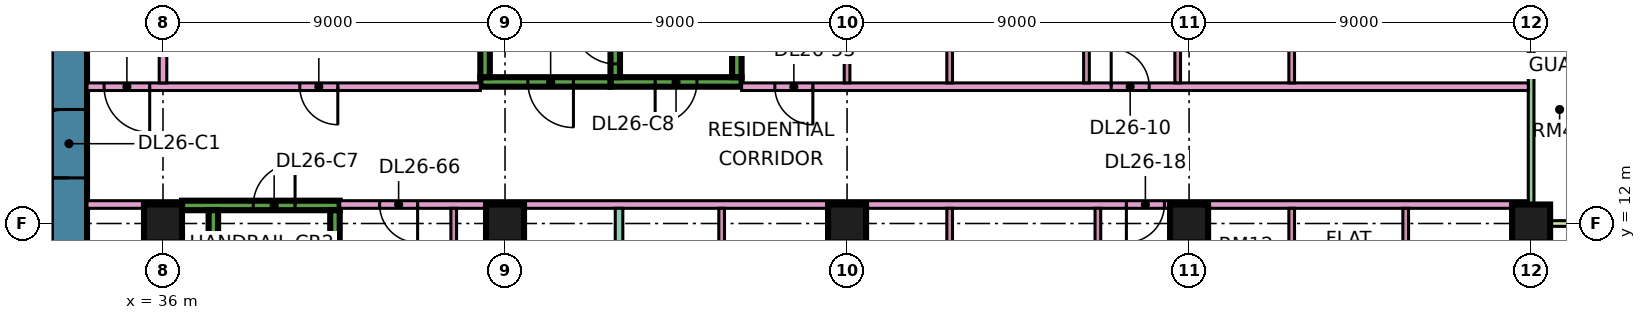
"""IFC4 building model, lengths in metres.
Left out: names, types, materials, properties, quantities, classifications, styles, units other than length and angle.
Written with IfcOpenShell. Run it as: python <this file> out.ifc"""

import sys

from ifc_helpers import new_model, si_unit, direction, frame, frame_2d, origin, origin_2d, place, context, subcontext, project, spatial, rectangle, extrude, element, fill, save


model = new_model("IFC4")
c1 = context("Model", 3, precision=1e-05, world=origin(), true_north=direction((0.0, 1.0)))
c2 = subcontext(c1, "Body", "Model", "MODEL_VIEW")
j1 = project(units=[si_unit("LENGTHUNIT", "METRE"), si_unit("PLANEANGLEUNIT", "RADIAN")], contexts=[c1])
p1 = place(None, origin())
s1 = spatial("IfcSite", under=j1, at=p1, CompositionType="ELEMENT")
p2 = place(p1, origin())
s2 = spatial("IfcBuilding", under=s1, at=p2, CompositionType="ELEMENT")
p3 = place(p2, frame((0.0, 0.0, 114.4)))
s3 = spatial("IfcBuildingStorey", under=s2, at=p3, CompositionType="ELEMENT", Elevation=114.4)
for number, where, z_axis, x_axis in (
    (1, (36.0, 12.0, 0.0), (0.0, 0.0, 1.0), (1.0, 0.0, 0.0)),
    (2, (45.0, 12.0, 0.0), (0.0, 0.0, 1.0), (1.0, 0.0, 0.0)),
    (3, (54.0, 12.0, 0.0), (0.0, 0.0, 1.0), (1.0, 0.0, 0.0)),
    (4, (63.0, 12.0, 0.0), (0.0, 0.0, 1.0), (1.0, 0.0, 0.0)),
    (5, (72.0, 12.0, 0.0), (0.0, 0.0, 1.0), (1.0, 0.0, 0.0)),
):
    element("IfcColumn", number, at=place(p3, frame(where, z_axis=z_axis, x_axis=x_axis)), inside=s3, PredefinedType="COLUMN", context=c2, shape_type="SweptSolid", body=[
        extrude(rectangle(XDim=1.0, YDim=1.0, at=origin_2d()), origin(), (0.0, 0.0, 1.0), 3.75),
    ])
p4 = place(p3, frame((33.525, 7.95, 0.0), z_axis=(0.0, 0.0, 1.0), x_axis=(0.0, 1.0, 0.0)))
e6 = element("IfcWall", 6, at=p4, inside=s3, PredefinedType="SHEAR", context=c2, shape_type="SweptSolid", body=[
    extrude(rectangle(XDim=11.1, YDim=0.95, at=frame_2d((5.55, 0.0))), origin(), (0.0, 0.0, 1.0), 3.75),
])
p5 = place(p4, frame((5.25, 0.0, 0.0)))
e7 = element("IfcOpeningElement", 7, at=p5, cuts=e6, PredefinedType="OPENING", context=c2, shape_type="SweptSolid", body=[
    extrude(rectangle(XDim=1.8, YDim=2.4, at=frame_2d((0.9, 1.2))), frame((0.0, 0.485, 0.0), z_axis=(0.0, -1.0, 0.0), x_axis=(1.0, 0.0, 0.0)), (0.0, 0.0, 1.0), 0.97),
])
p6 = place(p3, frame((36.5, 12.475, 0.0), z_axis=(0.0, 0.0, 1.0), x_axis=(1.0, 0.0, 0.0)))
e8 = element("IfcWall", 8, at=p6, inside=s3, PredefinedType="SHEAR", context=c2, shape_type="SweptSolid", body=[
    extrude(rectangle(XDim=4.15, YDim=0.25, at=frame_2d((2.075, 0.0))), origin(), (0.0, 0.0, 1.0), 3.75),
])
p7 = place(p6, frame((1.875, 0.0, 0.0)))
e9 = element("IfcOpeningElement", 9, at=p7, cuts=e8, PredefinedType="OPENING", context=c2, shape_type="SweptSolid", body=[
    extrude(rectangle(XDim=1.1, YDim=2.2, at=frame_2d((0.55, 1.1))), frame((0.0, 0.135, 0.0), z_axis=(0.0, -1.0, 0.0), x_axis=(1.0, 0.0, 0.0)), (0.0, 0.0, 1.0), 0.27),
])
for number, where, z_axis, x_axis in (
    (10, (37.325, 5.85, 0.0), (0.0, 0.0, 1.0), (0.0, 1.0, 0.0)),
    (11, (40.525, 5.85, 0.0), (0.0, 0.0, 1.0), (0.0, 1.0, 0.0)),
):
    element("IfcWall", number, at=place(p3, frame(where, z_axis=z_axis, x_axis=x_axis)), inside=s3, PredefinedType="SHEAR", context=c2, shape_type="SweptSolid", body=[
        extrude(rectangle(XDim=6.5, YDim=0.25, at=frame_2d((3.25, 0.0))), origin(), (0.0, 0.0, 1.0), 3.75),
    ])
p8 = place(p3, frame((47.775, 15.725, 0.0), z_axis=(0.0, 0.0, 1.0), x_axis=(1.0, 0.0, 0.0)))
e12 = element("IfcWall", 12, at=p8, inside=s3, PredefinedType="SHEAR", context=c2, shape_type="SweptSolid", body=[
    extrude(rectangle(XDim=3.45, YDim=0.25, at=frame_2d((1.725, 0.0))), origin(), (0.0, 0.0, 1.0), 3.75),
])
p9 = place(p8, frame((1.175, 0.0, 0.0)))
e13 = element("IfcOpeningElement", 13, at=p9, cuts=e12, PredefinedType="OPENING", context=c2, shape_type="SweptSolid", body=[
    extrude(rectangle(XDim=1.1, YDim=2.2, at=frame_2d((0.55, 1.1))), frame((0.0, 0.135, 0.0), z_axis=(0.0, -1.0, 0.0), x_axis=(1.0, 0.0, 0.0)), (0.0, 0.0, 1.0), 0.27),
])
p10 = place(p3, frame((47.9, 15.85, 0.0), z_axis=(0.0, 0.0, 1.0), x_axis=(0.0, 1.0, 0.0)))
e14 = element("IfcWall", 14, at=p10, inside=s3, PredefinedType="SHEAR", context=c2, shape_type="SweptSolid", body=[
    extrude(rectangle(XDim=6.5, YDim=0.25, at=frame_2d((3.25, 0.0))), origin(), (0.0, 0.0, 1.0), 3.75),
])
p11 = place(p10, frame((0.35, 0.0, 0.0)))
e15 = element("IfcOpeningElement", 15, at=p11, cuts=e14, PredefinedType="OPENING", context=c2, shape_type="SweptSolid", body=[
    extrude(rectangle(XDim=1.1, YDim=2.2, at=frame_2d((0.55, 1.1))), frame((0.0, 0.135, 0.0), z_axis=(0.0, -1.0, 0.0), x_axis=(1.0, 0.0, 0.0)), (0.0, 0.0, 1.0), 0.27),
])
p12 = place(p3, frame((51.1, 15.85, 0.0), z_axis=(0.0, 0.0, 1.0), x_axis=(0.0, 1.0, 0.0)))
e16 = element("IfcWall", 16, at=p12, inside=s3, PredefinedType="SHEAR", context=c2, shape_type="SweptSolid", body=[
    extrude(rectangle(XDim=6.5, YDim=0.25, at=frame_2d((3.25, 0.0))), origin(), (0.0, 0.0, 1.0), 3.75),
])
p13 = place(p3, frame((44.35, 15.725, 0.0), z_axis=(0.0, 0.0, 1.0), x_axis=(1.0, 0.0, 0.0)))
e17 = element("IfcWall", 17, at=p13, inside=s3, PredefinedType="SHEAR", context=c2, shape_type="SweptSolid", body=[
    extrude(rectangle(XDim=3.425, YDim=0.25, at=frame_2d((1.712, 0.0))), origin(), (0.0, 0.0, 1.0), 3.75),
])
p14 = place(p13, frame((1.25, 0.0, 0.0)))
e18 = element("IfcOpeningElement", 18, at=p14, cuts=e17, PredefinedType="OPENING", context=c2, shape_type="SweptSolid", body=[
    extrude(rectangle(XDim=1.2, YDim=2.2, at=frame_2d((0.6, 1.1))), frame((0.0, 0.135, 0.0), z_axis=(0.0, -1.0, 0.0), x_axis=(1.0, 0.0, 0.0)), (0.0, 0.0, 1.0), 0.27),
])
p15 = place(p3, frame((44.475, 15.85, 0.0), z_axis=(0.0, 0.0, 1.0), x_axis=(0.0, 1.0, 0.0)))
e19 = element("IfcWall", 19, at=p15, inside=s3, PredefinedType="SHEAR", context=c2, shape_type="SweptSolid", body=[
    extrude(rectangle(XDim=6.5, YDim=0.25, at=frame_2d((3.25, 0.0))), origin(), (0.0, 0.0, 1.0), 3.75),
])
p16 = place(p15, frame((1.75, 0.0, 0.0)))
e20 = element("IfcOpeningElement", 20, at=p16, cuts=e19, PredefinedType="OPENING", context=c2, shape_type="SweptSolid", body=[
    extrude(rectangle(XDim=1.1, YDim=2.2, at=frame_2d((0.55, 1.1))), frame((0.0, 0.135, 0.0), z_axis=(0.0, -1.0, 0.0), x_axis=(1.0, 0.0, 0.0)), (0.0, 0.0, 1.0), 0.27),
])
p17 = place(p15, frame((4.3, 0.0, 0.0)))
e21 = element("IfcOpeningElement", 21, at=p17, cuts=e19, PredefinedType="OPENING", context=c2, shape_type="SweptSolid", body=[
    extrude(rectangle(XDim=1.1, YDim=2.2, at=frame_2d((0.55, 1.1))), frame((0.0, 0.135, 0.0), z_axis=(0.0, -1.0, 0.0), x_axis=(1.0, 0.0, 0.0)), (0.0, 0.0, 1.0), 0.27),
])
p18 = place(p3, frame((72.0, 12.075, 0.0), z_axis=(0.0, 0.0, 1.0), x_axis=(0.0, 1.0, 0.0)))
e22 = element("IfcWall", 22, at=p18, inside=s3, PredefinedType="SOLIDWALL", context=c2, shape_type="SweptSolid", body=[
    extrude(rectangle(XDim=10.35, YDim=0.15, at=frame_2d((5.175, 0.0))), origin(), (0.0, 0.0, 1.0), 3.35),
])
p19 = place(p18, frame((3.975, 0.0, 0.45)))
e23 = element("IfcOpeningElement", 23, at=p19, cuts=e22, PredefinedType="OPENING", context=c2, shape_type="SweptSolid", body=[
    extrude(rectangle(XDim=2.4, YDim=2.4, at=frame_2d((1.2, 1.2))), frame((0.0, 0.085, 0.0), z_axis=(0.0, -1.0, 0.0), x_axis=(1.0, 0.0, 0.0)), (0.0, 0.0, 1.0), 0.17),
])
p20 = place(p18, frame((7.688, 0.0, 0.0)))
e24 = element("IfcOpeningElement", 24, at=p20, cuts=e22, PredefinedType="OPENING", context=c2, shape_type="SweptSolid", body=[
    extrude(rectangle(XDim=1.8, YDim=2.4, at=frame_2d((0.9, 1.2))), frame((0.0, 0.085, 0.0), z_axis=(0.0, -1.0, 0.0), x_axis=(1.0, 0.0, 0.0)), (0.0, 0.0, 1.0), 0.17),
])
p21 = place(p3, frame((73.5, 12.0, 0.0), z_axis=(0.0, 0.0, 1.0), x_axis=(-1.0, 0.0, 0.0)))
e25 = element("IfcWall", 25, at=p21, inside=s3, PredefinedType="SOLIDWALL", context=c2, shape_type="SweptSolid", body=[
    extrude(rectangle(XDim=1.5, YDim=0.15, at=frame_2d((0.75, 0.0))), origin(), (0.0, 0.0, 1.0), 3.35),
])
p22 = place(p3, frame((34.0, 12.5, 0.0), z_axis=(0.0, 0.0, 1.0), x_axis=(1.0, 0.0, 0.0)))
e26 = element("IfcWall", 26, at=p22, inside=s3, PredefinedType="PARTITIONING", context=c2, shape_type="SweptSolid", body=[
    extrude(rectangle(XDim=2.501, YDim=0.2, at=frame_2d((1.25, 0.0))), origin(), (0.0, 0.0, 1.0), 3.35),
])
p23 = place(p3, frame((34.0, 15.6, 0.0), z_axis=(0.0, 0.0, 1.0), x_axis=(1.0, 0.0, 0.0)))
e27 = element("IfcWall", 27, at=p23, inside=s3, PredefinedType="PARTITIONING", context=c2, shape_type="SweptSolid", body=[
    extrude(rectangle(XDim=10.35, YDim=0.2, at=frame_2d((5.175, 0.0))), origin(), (0.0, 0.0, 1.0), 3.35),
])
p24 = place(p23, frame((5.6, 0.0, 0.0)))
e28 = element("IfcOpeningElement", 28, at=p24, cuts=e27, PredefinedType="OPENING", context=c2, shape_type="SweptSolid", body=[
    extrude(rectangle(XDim=1.0, YDim=2.1, at=frame_2d((0.5, 1.05))), frame((0.0, 0.11, 0.0), z_axis=(0.0, -1.0, 0.0), x_axis=(1.0, 0.0, 0.0)), (0.0, 0.0, 1.0), 0.22),
])
p25 = place(p23, frame((0.45, 0.0, 0.0)))
e29 = element("IfcOpeningElement", 29, at=p25, cuts=e27, PredefinedType="OPENING", context=c2, shape_type="SweptSolid", body=[
    extrude(rectangle(XDim=1.2, YDim=2.1, at=frame_2d((0.6, 1.05))), frame((0.0, 0.11, 0.0), z_axis=(0.0, -1.0, 0.0), x_axis=(1.0, 0.0, 0.0)), (0.0, 0.0, 1.0), 0.22),
])
p26 = place(p3, frame((36.0, 15.7, 0.0), z_axis=(0.0, 0.0, 1.0), x_axis=(0.0, 1.0, 0.0)))
e30 = element("IfcWall", 30, at=p26, inside=s3, PredefinedType="PARTITIONING", context=c2, shape_type="SweptSolid", body=[
    extrude(rectangle(XDim=8.3, YDim=0.2, at=frame_2d((4.15, 0.0))), origin(), (0.0, 0.0, 1.0), 3.35),
])
p27 = place(p3, frame((40.65, 12.5, 0.0), z_axis=(0.0, 0.0, 1.0), x_axis=(1.0, 0.0, 0.0)))
e31 = element("IfcWall", 31, at=p27, inside=s3, PredefinedType="PARTITIONING", context=c2, shape_type="SweptSolid", body=[
    extrude(rectangle(XDim=31.276, YDim=0.2, at=frame_2d((15.638, 0.0))), origin(), (0.0, 0.0, 1.0), 3.35),
])
p28 = place(p27, frame((20.7, 0.0, 0.0)))
e32 = element("IfcOpeningElement", 32, at=p28, cuts=e31, PredefinedType="OPENING", context=c2, shape_type="SweptSolid", body=[
    extrude(rectangle(XDim=1.0, YDim=2.1, at=frame_2d((0.5, 1.05))), frame((0.0, 0.11, 0.0), z_axis=(0.0, -1.0, 0.0), x_axis=(1.0, 0.0, 0.0)), (0.0, 0.0, 1.0), 0.22),
])
p29 = place(p27, frame((1.05, 0.0, 0.0)))
e33 = element("IfcOpeningElement", 33, at=p29, cuts=e31, PredefinedType="OPENING", context=c2, shape_type="SweptSolid", body=[
    extrude(rectangle(XDim=1.0, YDim=2.1, at=frame_2d((0.5, 1.05))), frame((0.0, 0.11, 0.0), z_axis=(0.0, -1.0, 0.0), x_axis=(1.0, 0.0, 0.0)), (0.0, 0.0, 1.0), 0.22),
])
p30 = place(p3, frame((43.65, 5.825, 0.0), z_axis=(0.0, 0.0, 1.0), x_axis=(0.0, 1.0, 0.0)))
e34 = element("IfcWall", 34, at=p30, inside=s3, PredefinedType="PARTITIONING", context=c2, shape_type="SweptSolid", body=[
    extrude(rectangle(XDim=6.575, YDim=0.15, at=frame_2d((3.288, 0.0))), origin(), (0.0, 0.0, 1.0), 3.35),
])
p31 = place(p30, frame((4.425, 0.0, 0.0)))
e35 = element("IfcOpeningElement", 35, at=p31, cuts=e34, PredefinedType="OPENING", context=c2, shape_type="SweptSolid", body=[
    extrude(rectangle(XDim=0.9, YDim=2.1, at=frame_2d((0.45, 1.05))), frame((0.0, 0.085, 0.0), z_axis=(0.0, -1.0, 0.0), x_axis=(1.0, 0.0, 0.0)), (0.0, 0.0, 1.0), 0.17),
])
p32 = place(p3, frame((48.0, 0.0, 0.0), z_axis=(0.0, 0.0, 1.0), x_axis=(0.0, 1.0, 0.0)))
e36 = element("IfcWall", 36, at=p32, inside=s3, PredefinedType="PARTITIONING", context=c2, shape_type="SweptSolid", body=[
    extrude(rectangle(XDim=12.4, YDim=0.2, at=frame_2d((6.2, 0.0))), origin(), (0.0, 0.0, 1.0), 3.35),
])
p33 = place(p3, frame((50.7, 8.375, 0.0), z_axis=(0.0, 0.0, 1.0), x_axis=(0.0, 1.0, 0.0)))
e37 = element("IfcWall", 37, at=p33, inside=s3, PredefinedType="PARTITIONING", context=c2, shape_type="SweptSolid", body=[
    extrude(rectangle(XDim=4.025, YDim=0.15, at=frame_2d((2.012, 0.0))), origin(), (0.0, 0.0, 1.0), 3.35),
])
p34 = place(p3, frame((51.225, 15.6, 0.0), z_axis=(0.0, 0.0, 1.0), x_axis=(1.0, 0.0, 0.0)))
e38 = element("IfcWall", 38, at=p34, inside=s3, PredefinedType="PARTITIONING", context=c2, shape_type="SweptSolid", body=[
    extrude(rectangle(XDim=20.701, YDim=0.2, at=frame_2d((10.351, 0.0))), origin(), (0.0, 0.0, 1.0), 3.35),
])
p35 = place(p34, frame((9.725, 0.0, 0.0)))
e39 = element("IfcOpeningElement", 39, at=p35, cuts=e38, PredefinedType="OPENING", context=c2, shape_type="SweptSolid", body=[
    extrude(rectangle(XDim=1.0, YDim=2.1, at=frame_2d((0.5, 1.05))), frame((0.0, 0.11, 0.0), z_axis=(0.0, -1.0, 0.0), x_axis=(1.0, 0.0, 0.0)), (0.0, 0.0, 1.0), 0.22),
])
p36 = place(p34, frame((0.875, 0.0, 0.0)))
e40 = element("IfcOpeningElement", 40, at=p36, cuts=e38, PredefinedType="OPENING", context=c2, shape_type="SweptSolid", body=[
    extrude(rectangle(XDim=1.0, YDim=2.1, at=frame_2d((0.5, 1.05))), frame((0.0, 0.11, 0.0), z_axis=(0.0, -1.0, 0.0), x_axis=(1.0, 0.0, 0.0)), (0.0, 0.0, 1.0), 0.22),
])
p37 = place(p3, frame((53.7, 8.375, 0.0), z_axis=(0.0, 0.0, 1.0), x_axis=(0.0, 1.0, 0.0)))
e41 = element("IfcWall", 41, at=p37, inside=s3, PredefinedType="PARTITIONING", context=c2, shape_type="SweptSolid", body=[
    extrude(rectangle(XDim=4.025, YDim=0.15, at=frame_2d((2.012, 0.0))), origin(), (0.0, 0.0, 1.0), 3.35),
])
p38 = place(p3, frame((54.0, 15.7, 0.0), z_axis=(0.0, 0.0, 1.0), x_axis=(0.0, 1.0, 0.0)))
e42 = element("IfcWall", 42, at=p38, inside=s3, PredefinedType="PARTITIONING", context=c2, shape_type="SweptSolid", body=[
    extrude(rectangle(XDim=3.2, YDim=0.15, at=frame_2d((1.6, 0.0))), origin(), (0.0, 0.0, 1.0), 3.35),
])
p39 = place(p3, frame((56.7, 8.375, 0.0), z_axis=(0.0, 0.0, 1.0), x_axis=(0.0, 1.0, 0.0)))
e43 = element("IfcWall", 43, at=p39, inside=s3, PredefinedType="PARTITIONING", context=c2, shape_type="SweptSolid", body=[
    extrude(rectangle(XDim=4.025, YDim=0.15, at=frame_2d((2.012, 0.0))), origin(), (0.0, 0.0, 1.0), 3.35),
])
for number, where, z_axis, x_axis in (
    (44, (56.7, 15.7, 0.0), (0.0, 0.0, 1.0), (0.0, 1.0, 0.0)),
    (45, (60.3, 15.7, 0.0), (0.0, 0.0, 1.0), (0.0, 1.0, 0.0)),
):
    element("IfcWall", number, at=place(p3, frame(where, z_axis=z_axis, x_axis=x_axis)), inside=s3, PredefinedType="PARTITIONING", context=c2, shape_type="SweptSolid", body=[
        extrude(rectangle(XDim=3.125, YDim=0.15, at=frame_2d((1.562, 0.0))), origin(), (0.0, 0.0, 1.0), 3.35),
    ])
p40 = place(p3, frame((60.6, 8.375, 0.0), z_axis=(0.0, 0.0, 1.0), x_axis=(0.0, 1.0, 0.0)))
e46 = element("IfcWall", 46, at=p40, inside=s3, PredefinedType="PARTITIONING", context=c2, shape_type="SweptSolid", body=[
    extrude(rectangle(XDim=4.025, YDim=0.15, at=frame_2d((2.012, 0.0))), origin(), (0.0, 0.0, 1.0), 3.35),
])
p41 = place(p3, frame((62.7, 15.7, 0.0), z_axis=(0.0, 0.0, 1.0), x_axis=(0.0, 1.0, 0.0)))
e47 = element("IfcWall", 47, at=p41, inside=s3, PredefinedType="PARTITIONING", context=c2, shape_type="SweptSolid", body=[
    extrude(rectangle(XDim=3.125, YDim=0.15, at=frame_2d((1.562, 0.0))), origin(), (0.0, 0.0, 1.0), 3.35),
])
p42 = place(p41, frame((1.1, 0.0, 0.0)))
e48 = element("IfcOpeningElement", 48, at=p42, cuts=e47, PredefinedType="OPENING", context=c2, shape_type="SweptSolid", body=[
    extrude(rectangle(XDim=0.8, YDim=2.1, at=frame_2d((0.4, 1.05))), frame((0.0, 0.085, 0.0), z_axis=(0.0, -1.0, 0.0), x_axis=(1.0, 0.0, 0.0)), (0.0, 0.0, 1.0), 0.17),
])
p43 = place(p3, frame((63.3, 8.375, 0.0), z_axis=(0.0, 0.0, 1.0), x_axis=(0.0, 1.0, 0.0)))
e49 = element("IfcWall", 49, at=p43, inside=s3, PredefinedType="PARTITIONING", context=c2, shape_type="SweptSolid", body=[
    extrude(rectangle(XDim=4.025, YDim=0.15, at=frame_2d((2.012, 0.0))), origin(), (0.0, 0.0, 1.0), 3.35),
])
p44 = place(p43, frame((1.575, 0.0, 0.0)))
e50 = element("IfcOpeningElement", 50, at=p44, cuts=e49, PredefinedType="OPENING", context=c2, shape_type="SweptSolid", body=[
    extrude(rectangle(XDim=0.8, YDim=2.1, at=frame_2d((0.4, 1.05))), frame((0.0, 0.085, 0.0), z_axis=(0.0, -1.0, 0.0), x_axis=(1.0, 0.0, 0.0)), (0.0, 0.0, 1.0), 0.17),
])
p45 = place(p3, frame((65.7, 8.375, 0.0), z_axis=(0.0, 0.0, 1.0), x_axis=(0.0, 1.0, 0.0)))
e51 = element("IfcWall", 51, at=p45, inside=s3, PredefinedType="PARTITIONING", context=c2, shape_type="SweptSolid", body=[
    extrude(rectangle(XDim=4.025, YDim=0.15, at=frame_2d((2.012, 0.0))), origin(), (0.0, 0.0, 1.0), 3.35),
])
p46 = place(p3, frame((65.7, 15.7, 0.0), z_axis=(0.0, 0.0, 1.0), x_axis=(0.0, 1.0, 0.0)))
e52 = element("IfcWall", 52, at=p46, inside=s3, PredefinedType="PARTITIONING", context=c2, shape_type="SweptSolid", body=[
    extrude(rectangle(XDim=3.125, YDim=0.15, at=frame_2d((1.562, 0.0))), origin(), (0.0, 0.0, 1.0), 3.35),
])
p47 = place(p3, frame((68.7, 8.375, 0.0), z_axis=(0.0, 0.0, 1.0), x_axis=(0.0, 1.0, 0.0)))
e53 = element("IfcWall", 53, at=p47, inside=s3, PredefinedType="PARTITIONING", context=c2, shape_type="SweptSolid", body=[
    extrude(rectangle(XDim=4.025, YDim=0.15, at=frame_2d((2.012, 0.0))), origin(), (0.0, 0.0, 1.0), 3.35),
])
p48 = place(p19, origin())
e54 = element("IfcWindow", 54, at=p48, inside=s3, PartitioningType="SINGLE_PANEL", PredefinedType="WINDOW", context=c2, shape_type="SweptSolid", body=[
    extrude(rectangle(XDim=2.4, YDim=2.4, at=frame_2d((1.2, 1.2))), frame((0.0, 0.03, 0.0), z_axis=(0.0, -1.0, 0.0), x_axis=(1.0, 0.0, 0.0)), (0.0, 0.0, 1.0), 0.06),
])
fill(e23, e54)
p49 = place(p5, origin())
e55 = element("IfcDoor", 55, at=p49, inside=s3, OperationType="DOUBLE_DOOR_SINGLE_SWING", PredefinedType="DOOR", context=c2, shape_type="SweptSolid", body=[
    extrude(rectangle(XDim=1.8, YDim=2.4, at=frame_2d((0.9, 1.2))), frame((0.0, 0.025, 0.0), z_axis=(0.0, -1.0, 0.0), x_axis=(1.0, 0.0, 0.0)), (0.0, 0.0, 1.0), 0.05),
])
fill(e7, e55)
p50 = place(p7, frame((1.1, 0.0, 0.0), z_axis=(0.0, 0.0, 1.0), x_axis=(-1.0, 0.0, 0.0)))
e56 = element("IfcDoor", 56, at=p50, inside=s3, OperationType="SINGLE_SWING_RIGHT", PredefinedType="DOOR", context=c2, shape_type="SweptSolid", body=[
    extrude(rectangle(XDim=1.1, YDim=2.2, at=frame_2d((0.55, 1.1))), frame((0.0, 0.025, 0.0), z_axis=(0.0, -1.0, 0.0), x_axis=(1.0, 0.0, 0.0)), (0.0, 0.0, 1.0), 0.05),
])
fill(e9, e56)
p51 = place(p9, frame((1.1, 0.0, 0.0), z_axis=(0.0, 0.0, 1.0), x_axis=(-1.0, 0.0, 0.0)))
e57 = element("IfcDoor", 57, at=p51, inside=s3, OperationType="SINGLE_SWING_LEFT", PredefinedType="DOOR", context=c2, shape_type="SweptSolid", body=[
    extrude(rectangle(XDim=1.1, YDim=2.2, at=frame_2d((0.55, 1.1))), frame((0.0, 0.025, 0.0), z_axis=(0.0, -1.0, 0.0), x_axis=(1.0, 0.0, 0.0)), (0.0, 0.0, 1.0), 0.05),
])
fill(e13, e57)
p52 = place(p14, origin())
e58 = element("IfcDoor", 58, at=p52, inside=s3, OperationType="SINGLE_SWING_RIGHT", PredefinedType="DOOR", context=c2, shape_type="SweptSolid", body=[
    extrude(rectangle(XDim=1.2, YDim=2.2, at=frame_2d((0.6, 1.1))), frame((0.0, 0.025, 0.0), z_axis=(0.0, -1.0, 0.0), x_axis=(1.0, 0.0, 0.0)), (0.0, 0.0, 1.0), 0.05),
])
fill(e18, e58)
p53 = place(p11, frame((1.1, 0.0, 0.0), z_axis=(0.0, 0.0, 1.0), x_axis=(-1.0, 0.0, 0.0)))
e59 = element("IfcDoor", 59, at=p53, inside=s3, OperationType="SINGLE_SWING_RIGHT", PredefinedType="DOOR", context=c2, shape_type="SweptSolid", body=[
    extrude(rectangle(XDim=1.1, YDim=2.2, at=frame_2d((0.55, 1.1))), frame((0.0, 0.025, 0.0), z_axis=(0.0, -1.0, 0.0), x_axis=(1.0, 0.0, 0.0)), (0.0, 0.0, 1.0), 0.05),
])
fill(e15, e59)
p54 = place(p24, origin())
e60 = element("IfcDoor", 60, at=p54, inside=s3, OperationType="SINGLE_SWING_RIGHT", PredefinedType="DOOR", context=c2, shape_type="SweptSolid", body=[
    extrude(rectangle(XDim=1.0, YDim=2.1, at=frame_2d((0.5, 1.05))), frame((0.0, 0.025, 0.0), z_axis=(0.0, -1.0, 0.0), x_axis=(1.0, 0.0, 0.0)), (0.0, 0.0, 1.0), 0.05),
])
fill(e28, e60)
p55 = place(p35, origin())
e61 = element("IfcDoor", 61, at=p55, inside=s3, OperationType="SINGLE_SWING_LEFT", PredefinedType="DOOR", context=c2, shape_type="SweptSolid", body=[
    extrude(rectangle(XDim=1.0, YDim=2.1, at=frame_2d((0.5, 1.05))), frame((0.0, 0.025, 0.0), z_axis=(0.0, -1.0, 0.0), x_axis=(1.0, 0.0, 0.0)), (0.0, 0.0, 1.0), 0.05),
])
fill(e39, e61)
p56 = place(p28, frame((1.0, 0.0, 0.0), z_axis=(0.0, 0.0, 1.0), x_axis=(-1.0, 0.0, 0.0)))
e62 = element("IfcDoor", 62, at=p56, inside=s3, OperationType="SINGLE_SWING_LEFT", PredefinedType="DOOR", context=c2, shape_type="SweptSolid", body=[
    extrude(rectangle(XDim=1.0, YDim=2.1, at=frame_2d((0.5, 1.05))), frame((0.0, 0.025, 0.0), z_axis=(0.0, -1.0, 0.0), x_axis=(1.0, 0.0, 0.0)), (0.0, 0.0, 1.0), 0.05),
])
fill(e32, e62)
p57 = place(p25, origin())
e63 = element("IfcDoor", 63, at=p57, inside=s3, OperationType="SINGLE_SWING_RIGHT", PredefinedType="DOOR", context=c2, shape_type="SweptSolid", body=[
    extrude(rectangle(XDim=1.2, YDim=2.1, at=frame_2d((0.6, 1.05))), frame((0.0, 0.025, 0.0), z_axis=(0.0, -1.0, 0.0), x_axis=(1.0, 0.0, 0.0)), (0.0, 0.0, 1.0), 0.05),
])
fill(e29, e63)
p58 = place(p36, origin())
e64 = element("IfcDoor", 64, at=p58, inside=s3, OperationType="SINGLE_SWING_RIGHT", PredefinedType="DOOR", context=c2, shape_type="SweptSolid", body=[
    extrude(rectangle(XDim=1.0, YDim=2.1, at=frame_2d((0.5, 1.05))), frame((0.0, 0.025, 0.0), z_axis=(0.0, -1.0, 0.0), x_axis=(1.0, 0.0, 0.0)), (0.0, 0.0, 1.0), 0.05),
])
fill(e40, e64)
p59 = place(p29, origin())
e65 = element("IfcDoor", 65, at=p59, inside=s3, OperationType="SINGLE_SWING_RIGHT", PredefinedType="DOOR", context=c2, shape_type="SweptSolid", body=[
    extrude(rectangle(XDim=1.0, YDim=2.1, at=frame_2d((0.5, 1.05))), frame((0.0, 0.025, 0.0), z_axis=(0.0, -1.0, 0.0), x_axis=(1.0, 0.0, 0.0)), (0.0, 0.0, 1.0), 0.05),
])
fill(e33, e65)
save(model, sys.argv[1])
